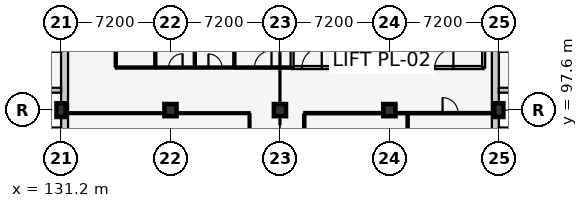
"""IFC4 building model, lengths in metres.
Left out: names, types, materials, properties, quantities, classifications, styles, units other than length and angle.
Written with IfcOpenShell. Run it as: python <this file> out.ifc"""

import sys

from ifc_helpers import new_model, si_unit, direction, frame, frame_2d, origin, origin_2d, place, context, subcontext, project, spatial, rectangle, extrude, element, fill, save


model = new_model("IFC4")
c1 = context("Model", 3, precision=1e-05, world=origin(), true_north=direction((0.0, 1.0)))
c2 = subcontext(c1, "Body", "Model", "MODEL_VIEW")
j1 = project(units=[si_unit("LENGTHUNIT", "METRE"), si_unit("PLANEANGLEUNIT", "RADIAN")], contexts=[c1])
p1 = place(None, origin())
s1 = spatial("IfcSite", under=j1, at=p1, CompositionType="ELEMENT")
p2 = place(p1, origin())
s2 = spatial("IfcBuilding", under=s1, at=p2, CompositionType="ELEMENT")
p3 = place(p2, frame((0.0, 0.0, 5.4)))
s3 = spatial("IfcBuildingStorey", under=s2, at=p3, CompositionType="ELEMENT", Elevation=5.4)
p4 = place(p3, frame((131.2, 97.6, 0.0), z_axis=(0.0, 0.0, 1.0), x_axis=(1.0, 0.0, 0.0)))
e1 = element("IfcColumn", 1, at=p4, inside=s3, PredefinedType="COLUMN", context=c2, shape_type="SweptSolid", body=[
    extrude(rectangle(XDim=0.6, YDim=0.9, at=origin_2d()), origin(), (0.0, 0.0, 1.0), 4.2),
])
for number, where, z_axis, x_axis in (
    (2, (138.4, 97.6, 0.0), (0.0, 0.0, 1.0), (1.0, 0.0, 0.0)),
    (3, (145.6, 97.6, 0.0), (0.0, 0.0, 1.0), (1.0, 0.0, 0.0)),
    (4, (152.8, 97.6, 0.0), (0.0, 0.0, 1.0), (1.0, 0.0, 0.0)),
):
    element("IfcColumn", number, at=place(p3, frame(where, z_axis=z_axis, x_axis=x_axis)), inside=s3, PredefinedType="COLUMN", context=c2, shape_type="SweptSolid", body=[
        extrude(rectangle(XDim=0.8, YDim=0.8, at=origin_2d()), origin(), (0.0, 0.0, 1.0), 4.2),
    ])
p5 = place(p3, frame((160.0, 97.6, 0.0), z_axis=(0.0, 0.0, 1.0), x_axis=(1.0, 0.0, 0.0)))
e5 = element("IfcColumn", 5, at=p5, inside=s3, PredefinedType="COLUMN", context=c2, shape_type="SweptSolid", body=[
    extrude(rectangle(XDim=0.6, YDim=0.9, at=origin_2d()), origin(), (0.0, 0.0, 1.0), 4.2),
])
p6 = place(p3, frame((159.77, 112.0, 0.0), z_axis=(0.0, 0.0, 1.0), x_axis=(0.0, -1.0, 0.0)))
e6 = element("IfcWall", 6, at=p6, inside=s3, PredefinedType="SOLIDWALL", context=c2, shape_type="SweptSolid", body=[
    extrude(rectangle(XDim=28.8, YDim=0.46, at=frame_2d((14.4, 0.0))), origin(), (0.0, 0.0, 1.0), 3.205),
])
for number, where, z_axis, x_axis in (
    (7, (160.0, 96.29, 0.0), (0.0, 0.0, 1.0), (1.0, 0.0, 0.0)),
    (8, (160.0, 98.91, 0.0), (0.0, 0.0, 1.0), (1.0, 0.0, 0.0)),
):
    element("IfcWall", number, at=place(p3, frame(where, z_axis=z_axis, x_axis=x_axis)), inside=s3, PredefinedType="SOLIDWALL", context=c2, shape_type="SweptSolid", body=[
        extrude(rectangle(XDim=1.35, YDim=0.32, at=frame_2d((0.675, 0.0))), origin(), (0.0, 0.0, 1.0), 3.93),
    ])
p7 = place(p3, frame((131.43, 83.2, 0.0), z_axis=(0.0, 0.0, 1.0), x_axis=(0.0, 1.0, 0.0)))
e9 = element("IfcWall", 9, at=p7, inside=s3, PredefinedType="SOLIDWALL", context=c2, shape_type="SweptSolid", body=[
    extrude(rectangle(XDim=28.8, YDim=0.46, at=frame_2d((14.4, 0.0))), origin(), (0.0, 0.0, 1.0), 3.205),
])
for number, where, z_axis, x_axis in (
    (10, (131.2, 96.29, 0.0), (0.0, 0.0, 1.0), (-1.0, 0.0, 0.0)),
    (11, (131.2, 98.91, 0.0), (0.0, 0.0, 1.0), (-1.0, 0.0, 0.0)),
):
    element("IfcWall", number, at=place(p3, frame(where, z_axis=z_axis, x_axis=x_axis)), inside=s3, PredefinedType="SOLIDWALL", context=c2, shape_type="SweptSolid", body=[
        extrude(rectangle(XDim=1.793, YDim=0.32, at=frame_2d((0.896, 0.0))), origin(), (0.0, 0.0, 1.0), 3.93),
    ])
p8 = place(p3, frame((146.4, 100.4, 0.0), z_axis=(0.0, 0.0, 1.0), x_axis=(1.0, 0.0, 0.0)))
e12 = element("IfcWall", 12, at=p8, inside=s3, PredefinedType="PARTITIONING", context=c2, shape_type="SweptSolid", body=[
    extrude(rectangle(XDim=2.6, YDim=0.2, at=frame_2d((1.3, 0.0))), origin(), (0.0, 0.0, 1.0), 3.95),
])
p9 = place(p8, frame((0.65, 0.0, 0.0)))
e13 = element("IfcOpeningElement", 13, at=p9, cuts=e12, PredefinedType="OPENING", context=c2, shape_type="SweptSolid", body=[
    extrude(rectangle(XDim=1.3, YDim=2.2, at=frame_2d((0.65, 1.1))), frame((0.0, 0.112, 0.0), z_axis=(0.0, -1.0, 0.0), x_axis=(1.0, 0.0, 0.0)), (0.0, 0.0, 1.0), 0.224),
])
p10 = place(p3, frame((146.4, 106.2, 0.0), z_axis=(0.0, 0.0, 1.0), x_axis=(0.0, -1.0, 0.0)))
e14 = element("IfcWall", 14, at=p10, inside=s3, PredefinedType="PARTITIONING", context=c2, shape_type="SweptSolid", body=[
    extrude(rectangle(XDim=5.8, YDim=0.2, at=frame_2d((2.9, 0.0))), origin(), (0.0, 0.0, 1.0), 3.95),
])
p11 = place(p3, frame((149.0, 100.4, 0.0), z_axis=(0.0, 0.0, 1.0), x_axis=(0.0, 1.0, 0.0)))
e15 = element("IfcWall", 15, at=p11, inside=s3, PredefinedType="PARTITIONING", context=c2, shape_type="SweptSolid", body=[
    extrude(rectangle(XDim=5.8, YDim=0.2, at=frame_2d((2.9, 0.0))), origin(), (0.0, 0.0, 1.0), 3.375),
])
p12 = place(p3, frame((153.8, 100.4, 0.0), z_axis=(0.0, 0.0, 1.0), x_axis=(1.0, 0.0, 0.0)))
e16 = element("IfcWall", 16, at=p12, inside=s3, PredefinedType="PARTITIONING", context=c2, shape_type="SweptSolid", body=[
    extrude(rectangle(XDim=5.2, YDim=0.2, at=frame_2d((2.6, 0.0))), origin(), (0.0, 0.0, 1.0), 3.95),
])
p13 = place(p12, frame((1.99, 0.0, 0.0)))
e17 = element("IfcOpeningElement", 17, at=p13, cuts=e16, PredefinedType="OPENING", context=c2, shape_type="SweptSolid", body=[
    extrude(rectangle(XDim=1.22, YDim=2.2, at=frame_2d((0.61, 1.1))), frame((0.0, 0.112, 0.0), z_axis=(0.0, -1.0, 0.0), x_axis=(1.0, 0.0, 0.0)), (0.0, 0.0, 1.0), 0.224),
])
for number, where, z_axis, x_axis in (
    (18, (153.8, 106.2, 0.0), (0.0, 0.0, 1.0), (0.0, -1.0, 0.0)),
    (19, (159.0, 100.4, 0.0), (0.0, 0.0, 1.0), (0.0, 1.0, 0.0)),
):
    element("IfcWall", number, at=place(p3, frame(where, z_axis=z_axis, x_axis=x_axis)), inside=s3, PredefinedType="PARTITIONING", context=c2, shape_type="SweptSolid", body=[
        extrude(rectangle(XDim=5.8, YDim=0.2, at=frame_2d((2.9, 0.0))), origin(), (0.0, 0.0, 1.0), 3.95),
    ])
p14 = place(p3, frame((134.8, 100.4, 0.0), z_axis=(0.0, 0.0, 1.0), x_axis=(1.0, 0.0, 0.0)))
e20 = element("IfcWall", 20, at=p14, inside=s3, PredefinedType="PARTITIONING", context=c2, shape_type="SweptSolid", body=[
    extrude(rectangle(XDim=2.6, YDim=0.14, at=frame_2d((1.3, 0.0))), origin(), (0.0, 0.0, 1.0), 3.95),
])
p15 = place(p3, frame((134.8, 100.48, 0.0), z_axis=(0.0, 0.0, 1.0), x_axis=(0.0, 1.0, 0.0)))
e21 = element("IfcWall", 21, at=p15, inside=s3, PredefinedType="PARTITIONING", context=c2, shape_type="SweptSolid", body=[
    extrude(rectangle(XDim=4.86, YDim=0.14, at=frame_2d((2.43, 0.0))), origin(), (0.0, 0.0, 1.0), 3.595),
])
p16 = place(p15, frame((1.93, 0.0, 0.0)))
e22 = element("IfcOpeningElement", 22, at=p16, cuts=e21, PredefinedType="OPENING", context=c2, shape_type="SweptSolid", body=[
    extrude(rectangle(XDim=1.0, YDim=2.1, at=frame_2d((0.5, 1.05))), frame((0.0, 0.082, 0.0), z_axis=(0.0, -1.0, 0.0), x_axis=(1.0, 0.0, 0.0)), (0.0, 0.0, 1.0), 0.164),
])
p17 = place(p3, frame((137.4, 100.48, 0.0), z_axis=(0.0, 0.0, 1.0), x_axis=(0.0, 1.0, 0.0)))
e23 = element("IfcWall", 23, at=p17, inside=s3, PredefinedType="PARTITIONING", context=c2, shape_type="SweptSolid", body=[
    extrude(rectangle(XDim=4.86, YDim=0.14, at=frame_2d((2.43, 0.0))), origin(), (0.0, 0.0, 1.0), 3.95),
])
p18 = place(p3, frame((137.48, 100.4, 0.0), z_axis=(0.0, 0.0, 1.0), x_axis=(1.0, 0.0, 0.0)))
e24 = element("IfcWall", 24, at=p18, inside=s3, PredefinedType="PARTITIONING", context=c2, shape_type="SweptSolid", body=[
    extrude(rectangle(XDim=2.52, YDim=0.14, at=frame_2d((1.26, 0.0))), origin(), (0.0, 0.0, 1.0), 3.95),
])
p19 = place(p18, frame((0.805, 0.0, 0.0)))
e25 = element("IfcOpeningElement", 25, at=p19, cuts=e24, PredefinedType="OPENING", context=c2, shape_type="SweptSolid", body=[
    extrude(rectangle(XDim=0.91, YDim=2.06, at=frame_2d((0.455, 1.03))), frame((0.0, 0.082, 0.0), z_axis=(0.0, -1.0, 0.0), x_axis=(1.0, 0.0, 0.0)), (0.0, 0.0, 1.0), 0.164),
])
p20 = place(p3, frame((140.0, 100.48, 0.0), z_axis=(0.0, 0.0, 1.0), x_axis=(0.0, 1.0, 0.0)))
e26 = element("IfcWall", 26, at=p20, inside=s3, PredefinedType="PARTITIONING", context=c2, shape_type="SweptSolid", body=[
    extrude(rectangle(XDim=4.86, YDim=0.14, at=frame_2d((2.43, 0.0))), origin(), (0.0, 0.0, 1.0), 3.95),
])
p21 = place(p3, frame((140.08, 100.4, 0.0), z_axis=(0.0, 0.0, 1.0), x_axis=(1.0, 0.0, 0.0)))
e27 = element("IfcWall", 27, at=p21, inside=s3, PredefinedType="PARTITIONING", context=c2, shape_type="SweptSolid", body=[
    extrude(rectangle(XDim=2.52, YDim=0.14, at=frame_2d((1.26, 0.0))), origin(), (0.0, 0.0, 1.0), 3.95),
])
p22 = place(p21, frame((0.815, 0.0, 0.0)))
e28 = element("IfcOpeningElement", 28, at=p22, cuts=e27, PredefinedType="OPENING", context=c2, shape_type="SweptSolid", body=[
    extrude(rectangle(XDim=0.89, YDim=2.05, at=frame_2d((0.445, 1.025))), frame((0.0, 0.082, 0.0), z_axis=(0.0, -1.0, 0.0), x_axis=(1.0, 0.0, 0.0)), (0.0, 0.0, 1.0), 0.164),
])
p23 = place(p3, frame((142.6, 100.48, 0.0), z_axis=(0.0, 0.0, 1.0), x_axis=(0.0, 1.0, 0.0)))
e29 = element("IfcWall", 29, at=p23, inside=s3, PredefinedType="PARTITIONING", context=c2, shape_type="SweptSolid", body=[
    extrude(rectangle(XDim=4.86, YDim=0.14, at=frame_2d((2.43, 0.0))), origin(), (0.0, 0.0, 1.0), 3.95),
])
p24 = place(p3, frame((142.68, 100.4, 0.0), z_axis=(0.0, 0.0, 1.0), x_axis=(1.0, 0.0, 0.0)))
e30 = element("IfcWall", 30, at=p24, inside=s3, PredefinedType="PARTITIONING", context=c2, shape_type="SweptSolid", body=[
    extrude(rectangle(XDim=3.61, YDim=0.15, at=frame_2d((1.805, 0.0))), origin(), (0.0, 0.0, 1.0), 3.95),
])
p25 = place(p24, frame((1.245, 0.0, 0.0)))
e31 = element("IfcOpeningElement", 31, at=p25, cuts=e30, PredefinedType="OPENING", context=c2, shape_type="SweptSolid", body=[
    extrude(rectangle(XDim=1.12, YDim=2.15, at=frame_2d((0.56, 1.075))), frame((0.0, 0.087, 0.0), z_axis=(0.0, -1.0, 0.0), x_axis=(1.0, 0.0, 0.0)), (0.0, 0.0, 1.0), 0.174),
])
p26 = place(p3, frame((131.67, 97.4, 0.0), z_axis=(0.0, 0.0, 1.0), x_axis=(1.0, 0.0, 0.0)))
e32 = element("IfcWall", 32, at=p26, inside=s3, PredefinedType="PARTITIONING", context=c2, shape_type="SweptSolid", body=[
    extrude(rectangle(XDim=11.93, YDim=0.125, at=frame_2d((5.965, 0.0))), origin(), (0.0, 0.0, 1.0), 3.275),
])
p27 = place(p3, frame((143.6, 90.472, 0.0), z_axis=(0.0, 0.0, 1.0), x_axis=(0.0, 1.0, 0.0)))
e33 = element("IfcWall", 33, at=p27, inside=s3, PredefinedType="PARTITIONING", context=c2, shape_type="SweptSolid", body=[
    extrude(rectangle(XDim=6.855, YDim=0.125, at=frame_2d((3.427, 0.0))), origin(), (0.0, 0.0, 1.0), 3.95),
])
p28 = place(p3, frame((147.2, 97.4, 0.0), z_axis=(0.0, 0.0, 1.0), x_axis=(1.0, 0.0, 0.0)))
e34 = element("IfcWall", 34, at=p28, inside=s3, PredefinedType="PARTITIONING", context=c2, shape_type="SweptSolid", body=[
    extrude(rectangle(XDim=6.8, YDim=0.15, at=frame_2d((3.4, 0.0))), origin(), (0.0, 0.0, 1.0), 3.125),
])
p29 = place(p3, frame((147.2, 90.485, 0.0), z_axis=(0.0, 0.0, 1.0), x_axis=(0.0, 1.0, 0.0)))
e35 = element("IfcWall", 35, at=p29, inside=s3, PredefinedType="PARTITIONING", context=c2, shape_type="SweptSolid", body=[
    extrude(rectangle(XDim=6.83, YDim=0.15, at=frame_2d((3.415, 0.0))), origin(), (0.0, 0.0, 1.0), 3.95),
])
p30 = place(p29, frame((2.895, 0.0, 0.0)))
e36 = element("IfcOpeningElement", 36, at=p30, cuts=e35, PredefinedType="OPENING", context=c2, shape_type="SweptSolid", body=[
    extrude(rectangle(XDim=1.04, YDim=2.15, at=frame_2d((0.52, 1.075))), frame((0.0, 0.087, 0.0), z_axis=(0.0, -1.0, 0.0), x_axis=(1.0, 0.0, 0.0)), (0.0, 0.0, 1.0), 0.174),
])
p31 = place(p3, frame((154.0, 90.485, 0.0), z_axis=(0.0, 0.0, 1.0), x_axis=(0.0, 1.0, 0.0)))
e37 = element("IfcWall", 37, at=p31, inside=s3, PredefinedType="PARTITIONING", context=c2, shape_type="SweptSolid", body=[
    extrude(rectangle(XDim=6.83, YDim=0.15, at=frame_2d((3.415, 0.0))), origin(), (0.0, 0.0, 1.0), 3.95),
])
p32 = place(p3, frame((154.085, 97.4, 0.0), z_axis=(0.0, 0.0, 1.0), x_axis=(1.0, 0.0, 0.0)))
e38 = element("IfcWall", 38, at=p32, inside=s3, PredefinedType="PARTITIONING", context=c2, shape_type="SweptSolid", body=[
    extrude(rectangle(XDim=5.445, YDim=0.15, at=frame_2d((2.723, 0.0))), origin(), (0.0, 0.0, 1.0), 3.125),
])
p33 = place(p32, frame((2.212, 0.0, 0.0)))
e39 = element("IfcOpeningElement", 39, at=p33, cuts=e38, PredefinedType="OPENING", context=c2, shape_type="SweptSolid", body=[
    extrude(rectangle(XDim=1.02, YDim=2.12, at=frame_2d((0.51, 1.06))), frame((0.0, 0.087, 0.0), z_axis=(0.0, -1.0, 0.0), x_axis=(1.0, 0.0, 0.0)), (0.0, 0.0, 1.0), 0.174),
])
p34 = place(p9, origin())
e40 = element("IfcDoor", 40, at=p34, inside=s3, OperationType="SINGLE_SWING_RIGHT", PredefinedType="DOOR", context=c2, shape_type="SweptSolid", body=[
    extrude(rectangle(XDim=1.3, YDim=2.2, at=frame_2d((0.65, 1.1))), frame((0.0, 0.025, 0.0), z_axis=(0.0, -1.0, 0.0), x_axis=(1.0, 0.0, 0.0)), (0.0, 0.0, 1.0), 0.05),
])
fill(e13, e40)
p35 = place(p13, origin())
e41 = element("IfcDoor", 41, at=p35, inside=s3, OperationType="SINGLE_SWING_RIGHT", PredefinedType="DOOR", context=c2, shape_type="SweptSolid", body=[
    extrude(rectangle(XDim=1.22, YDim=2.2, at=frame_2d((0.61, 1.1))), frame((0.0, 0.025, 0.0), z_axis=(0.0, -1.0, 0.0), x_axis=(1.0, 0.0, 0.0)), (0.0, 0.0, 1.0), 0.05),
])
fill(e17, e41)
p36 = place(p19, origin())
e42 = element("IfcDoor", 42, at=p36, inside=s3, OperationType="SINGLE_SWING_RIGHT", PredefinedType="DOOR", context=c2, shape_type="SweptSolid", body=[
    extrude(rectangle(XDim=0.91, YDim=2.06, at=frame_2d((0.455, 1.03))), frame((0.0, 0.025, 0.0), z_axis=(0.0, -1.0, 0.0), x_axis=(1.0, 0.0, 0.0)), (0.0, 0.0, 1.0), 0.05),
])
fill(e25, e42)
p37 = place(p22, origin())
e43 = element("IfcDoor", 43, at=p37, inside=s3, OperationType="SINGLE_SWING_LEFT", PredefinedType="DOOR", context=c2, shape_type="SweptSolid", body=[
    extrude(rectangle(XDim=0.89, YDim=2.05, at=frame_2d((0.445, 1.025))), frame((0.0, 0.025, 0.0), z_axis=(0.0, -1.0, 0.0), x_axis=(1.0, 0.0, 0.0)), (0.0, 0.0, 1.0), 0.05),
])
fill(e28, e43)
p38 = place(p25, origin())
e44 = element("IfcDoor", 44, at=p38, inside=s3, OperationType="SINGLE_SWING_RIGHT", PredefinedType="DOOR", context=c2, shape_type="SweptSolid", body=[
    extrude(rectangle(XDim=1.12, YDim=2.15, at=frame_2d((0.56, 1.075))), frame((0.0, 0.025, 0.0), z_axis=(0.0, -1.0, 0.0), x_axis=(1.0, 0.0, 0.0)), (0.0, 0.0, 1.0), 0.05),
])
fill(e31, e44)
p39 = place(p33, origin())
e45 = element("IfcDoor", 45, at=p39, inside=s3, OperationType="SINGLE_SWING_LEFT", PredefinedType="DOOR", context=c2, shape_type="SweptSolid", body=[
    extrude(rectangle(XDim=1.02, YDim=2.12, at=frame_2d((0.51, 1.06))), frame((0.0, 0.025, 0.0), z_axis=(0.0, -1.0, 0.0), x_axis=(1.0, 0.0, 0.0)), (0.0, 0.0, 1.0), 0.05),
])
fill(e39, e45)
save(model, sys.argv[1])
